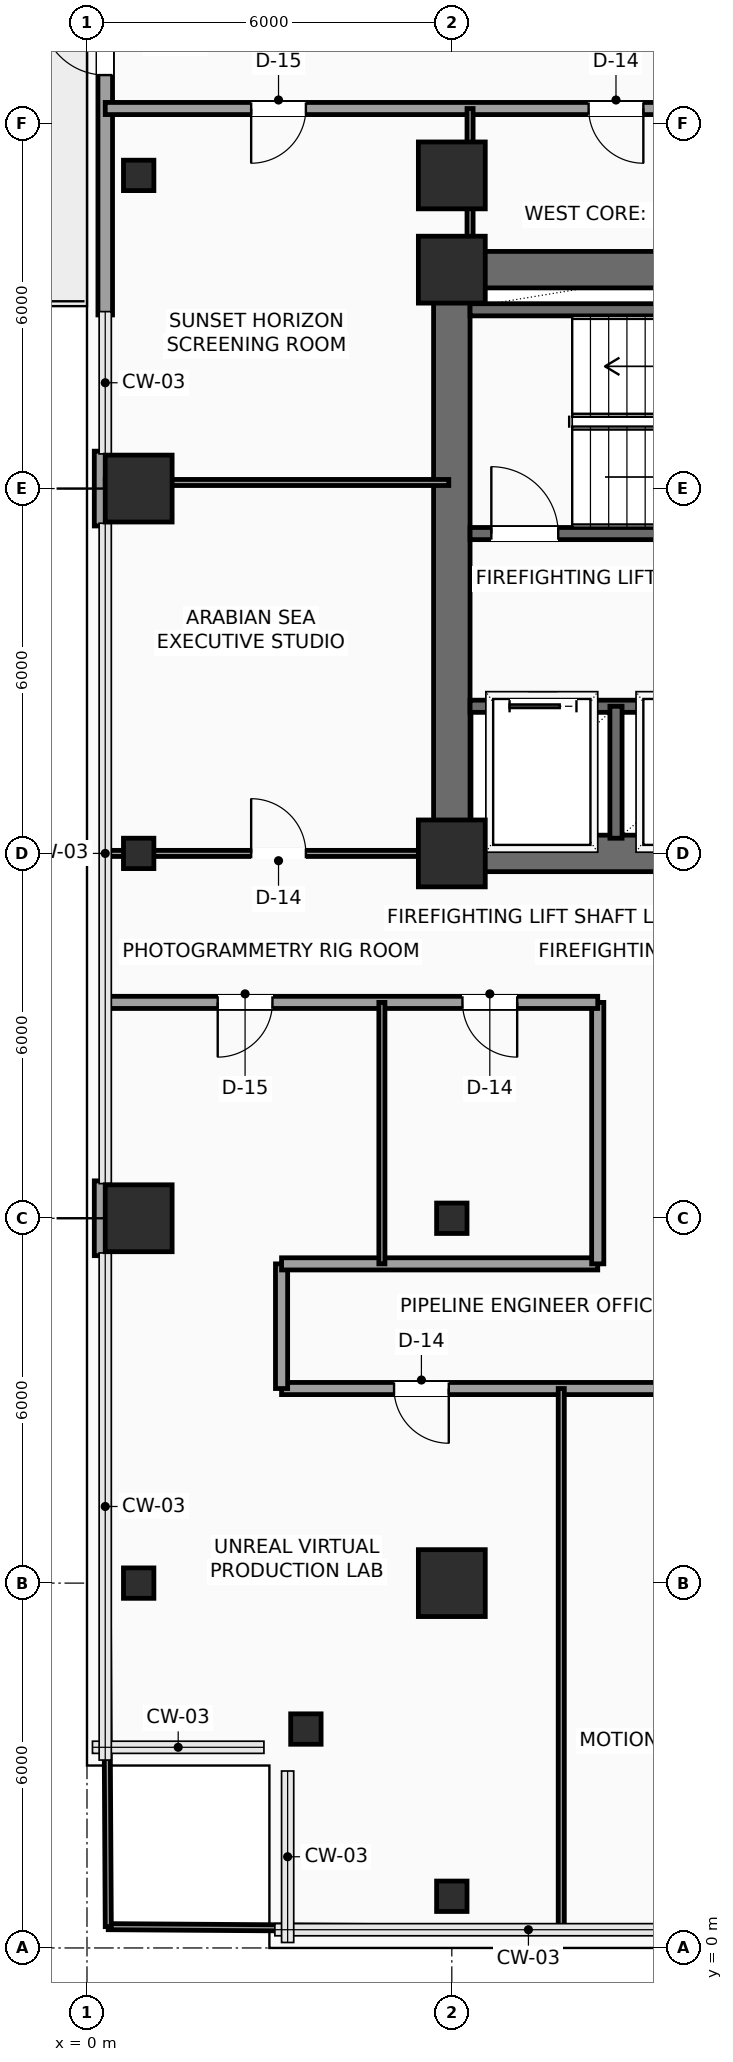
"""IFC4 building model, lengths in metres.
Left out: names, types, materials, properties, quantities, classifications, styles, units other than length and angle.
Written with IfcOpenShell. Run it as: python <this file> out.ifc"""

import sys

from ifc_helpers import new_model, si_unit, direction, frame, frame_2d, origin, origin_2d, place, context, subcontext, project, spatial, rectangle, hollow_rectangle, extrude, element, fill, save


model = new_model("IFC4")
c1 = context("Model", 3, precision=1e-05, world=origin(), true_north=direction((0.0, 1.0)))
c2 = subcontext(c1, "Body", "Model", "MODEL_VIEW")
j1 = project(units=[si_unit("LENGTHUNIT", "METRE"), si_unit("PLANEANGLEUNIT", "RADIAN")], contexts=[c1])
p1 = place(None, origin())
s1 = spatial("IfcSite", under=j1, at=p1, CompositionType="ELEMENT")
p2 = place(p1, origin())
s2 = spatial("IfcBuilding", under=s1, at=p2, CompositionType="ELEMENT")
p3 = place(p2, frame((0.0, 0.0, 138.15)))
s3 = spatial("IfcBuildingStorey", under=s2, at=p3, CompositionType="ELEMENT", Elevation=138.15)
for number, where, z_axis, x_axis in (
    (1, (6.0, 18.0, 0.0), (0.0, 0.0, 1.0), (1.0, 0.0, 0.0)),
    (2, (6.0, 27.6, 0.0), (0.0, 0.0, 1.0), (1.0, 0.0, 0.0)),
):
    element("IfcColumn", number, at=place(p3, frame(where, z_axis=z_axis, x_axis=x_axis)), inside=s3, PredefinedType="COLUMN", context=c2, shape_type="SweptSolid", body=[
        extrude(rectangle(XDim=1.1, YDim=1.1, at=origin_2d()), origin(), (0.0, 0.0, 1.0), 3.75),
    ])
for number, where, z_axis, x_axis in (
    (3, (3.6, 3.6, 0.0), (0.0, 0.0, 1.0), (1.0, 0.0, 0.0)),
    (4, (0.85, 6.0, 0.0), (0.0, 0.0, 1.0), (1.0, 0.0, 0.0)),
):
    element("IfcColumn", number, at=place(p3, frame(where, z_axis=z_axis, x_axis=x_axis)), inside=s3, PredefinedType="COLUMN", context=c2, shape_type="SweptSolid", body=[
        extrude(hollow_rectangle(XDim=0.5, YDim=0.5, WallThickness=0.025, InnerFilletRadius=0.025, OuterFilletRadius=0.04, at=origin_2d()), origin(), (0.0, 0.0, 1.0), 3.75),
    ])
p4 = place(p3, frame((0.85, 12.0, 0.0), z_axis=(0.0, 0.0, 1.0), x_axis=(1.0, 0.0, 0.0)))
e5 = element("IfcColumn", 5, at=p4, inside=s3, PredefinedType="COLUMN", context=c2, shape_type="SweptSolid", body=[
    extrude(rectangle(XDim=1.1, YDim=1.1, at=origin_2d()), origin(), (0.0, 0.0, 1.0), 3.75),
])
p5 = place(p3, frame((0.85, 18.0, 0.0), z_axis=(0.0, 0.0, 1.0), x_axis=(1.0, 0.0, 0.0)))
e6 = element("IfcColumn", 6, at=p5, inside=s3, PredefinedType="COLUMN", context=c2, shape_type="SweptSolid", body=[
    extrude(hollow_rectangle(XDim=0.5, YDim=0.5, WallThickness=0.025, InnerFilletRadius=0.025, OuterFilletRadius=0.04, at=origin_2d()), origin(), (0.0, 0.0, 1.0), 3.75),
])
p6 = place(p3, frame((0.85, 24.0, 0.0), z_axis=(0.0, 0.0, 1.0), x_axis=(1.0, 0.0, 0.0)))
e7 = element("IfcColumn", 7, at=p6, inside=s3, PredefinedType="COLUMN", context=c2, shape_type="SweptSolid", body=[
    extrude(rectangle(XDim=1.1, YDim=1.1, at=origin_2d()), origin(), (0.0, 0.0, 1.0), 3.75),
])
for number, where, z_axis, x_axis in (
    (8, (0.85, 29.15, 0.0), (0.0, 0.0, 1.0), (1.0, 0.0, 0.0)),
    (9, (6.0, 0.85, 0.0), (0.0, 0.0, 1.0), (1.0, 0.0, 0.0)),
):
    element("IfcColumn", number, at=place(p3, frame(where, z_axis=z_axis, x_axis=x_axis)), inside=s3, PredefinedType="COLUMN", context=c2, shape_type="SweptSolid", body=[
        extrude(hollow_rectangle(XDim=0.5, YDim=0.5, WallThickness=0.025, InnerFilletRadius=0.025, OuterFilletRadius=0.04, at=origin_2d()), origin(), (0.0, 0.0, 1.0), 3.75),
    ])
p7 = place(p3, frame((6.0, 6.0, 0.0), z_axis=(0.0, 0.0, 1.0), x_axis=(1.0, 0.0, 0.0)))
e10 = element("IfcColumn", 10, at=p7, inside=s3, PredefinedType="COLUMN", context=c2, shape_type="SweptSolid", body=[
    extrude(rectangle(XDim=1.1, YDim=1.1, at=origin_2d()), origin(), (0.0, 0.0, 1.0), 3.75),
])
p8 = place(p3, frame((6.0, 12.0, 0.0), z_axis=(0.0, 0.0, 1.0), x_axis=(1.0, 0.0, 0.0)))
e11 = element("IfcColumn", 11, at=p8, inside=s3, PredefinedType="COLUMN", context=c2, shape_type="SweptSolid", body=[
    extrude(hollow_rectangle(XDim=0.5, YDim=0.5, WallThickness=0.025, InnerFilletRadius=0.025, OuterFilletRadius=0.04, at=origin_2d()), origin(), (0.0, 0.0, 1.0), 3.75),
])
p9 = place(p3, frame((6.0, 29.15, 0.0), z_axis=(0.0, 0.0, 1.0), x_axis=(1.0, 0.0, 0.0)))
e12 = element("IfcColumn", 12, at=p9, inside=s3, PredefinedType="COLUMN", context=c2, shape_type="SweptSolid", body=[
    extrude(rectangle(XDim=1.1, YDim=1.1, at=origin_2d()), origin(), (0.0, 0.0, 1.0), 3.75),
])
p10 = place(p3, frame((0.3, 26.855, 0.0), z_axis=(0.0, 0.0, 1.0), x_axis=(0.0, 1.0, 0.0)))
e13 = element("IfcWall", 13, at=p10, inside=s3, PredefinedType="SOLIDWALL", context=c2, shape_type="SweptSolid", body=[
    extrude(rectangle(XDim=9.29, YDim=0.24, at=frame_2d((4.645, 0.0))), origin(), (0.0, 0.0, 1.0), 3.525),
])
p11 = place(p10, frame((3.945, 0.0, 0.0)))
e14 = element("IfcOpeningElement", 14, at=p11, cuts=e13, PredefinedType="OPENING", context=c2, shape_type="SweptSolid", body=[
    extrude(rectangle(XDim=1.05, YDim=2.2, at=frame_2d((0.525, 1.1))), frame((0.0, 0.13, 0.0), z_axis=(0.0, -1.0, 0.0), x_axis=(1.0, 0.0, 0.0)), (0.0, 0.0, 1.0), 0.26),
])
for number, where, z_axis, x_axis in (
    (15, (0.24, 11.385, 0.0), (0.0, 0.0, 1.0), (0.0, 1.0, 0.0)),
    (16, (0.24, 23.385, 0.0), (0.0, 0.0, 1.0), (0.0, 1.0, 0.0)),
):
    element("IfcWall", number, at=place(p3, frame(where, z_axis=z_axis, x_axis=x_axis)), inside=s3, PredefinedType="SOLIDWALL", context=c2, shape_type="SweptSolid", body=[
        extrude(rectangle(XDim=1.23, YDim=0.24, at=frame_2d((0.615, 0.0))), origin(), (0.0, 0.0, 1.0), 3.525),
    ])
p12 = place(p3, frame((6.0, 18.0, 0.0), z_axis=(0.0, 0.0, 1.0), x_axis=(1.0, 0.0, 0.0)))
e17 = element("IfcWall", 17, at=p12, inside=s3, PredefinedType="SHEAR", context=c2, shape_type="SweptSolid", body=[
    extrude(rectangle(XDim=12.0, YDim=0.6, at=frame_2d((6.0, 0.0))), origin(), (0.0, 0.0, 1.0), 3.525),
])
p13 = place(p12, frame((7.15, 0.0, 0.0)))
e18 = element("IfcOpeningElement", 18, at=p13, cuts=e17, PredefinedType="OPENING", context=c2, shape_type="SweptSolid", body=[
    extrude(rectangle(XDim=1.6, YDim=2.3, at=frame_2d((0.8, 1.15))), frame((0.0, 0.31, 0.0), z_axis=(0.0, -1.0, 0.0), x_axis=(1.0, 0.0, 0.0)), (0.0, 0.0, 1.0), 0.62),
])
p14 = place(p3, frame((6.0, 27.6, 0.0), z_axis=(0.0, 0.0, 1.0), x_axis=(1.0, 0.0, 0.0)))
e19 = element("IfcWall", 19, at=p14, inside=s3, PredefinedType="SHEAR", context=c2, shape_type="SweptSolid", body=[
    extrude(rectangle(XDim=12.0, YDim=0.6, at=frame_2d((6.0, 0.0))), origin(), (0.0, 0.0, 1.0), 3.525),
])
p15 = place(p14, frame((10.2, 0.0, 0.0)))
e20 = element("IfcOpeningElement", 20, at=p15, cuts=e19, PredefinedType="OPENING", context=c2, shape_type="SweptSolid", body=[
    extrude(rectangle(XDim=0.9, YDim=2.15, at=frame_2d((0.45, 1.075))), frame((0.0, 0.31, 0.0), z_axis=(0.0, -1.0, 0.0), x_axis=(1.0, 0.0, 0.0)), (0.0, 0.0, 1.0), 0.62),
])
p16 = place(p3, frame((6.0, 18.0, 0.0), z_axis=(0.0, 0.0, 1.0), x_axis=(0.0, 1.0, 0.0)))
e21 = element("IfcWall", 21, at=p16, inside=s3, PredefinedType="SHEAR", context=c2, shape_type="SweptSolid", body=[
    extrude(rectangle(XDim=9.6, YDim=0.6, at=frame_2d((4.8, 0.0))), origin(), (0.0, 0.0, 1.0), 3.525),
])
p17 = place(p3, frame((6.3, 23.26, 0.0), z_axis=(0.0, 0.0, 1.0), x_axis=(1.0, 0.0, 0.0)))
e22 = element("IfcWall", 22, at=p17, inside=s3, PredefinedType="SHEAR", context=c2, shape_type="SweptSolid", body=[
    extrude(rectangle(XDim=8.88, YDim=0.2, at=frame_2d((4.44, 0.0))), origin(), (0.0, 0.0, 1.0), 3.525),
])
p18 = place(p17, frame((0.35, 0.0, 0.0)))
e23 = element("IfcOpeningElement", 23, at=p18, cuts=e22, PredefinedType="OPENING", context=c2, shape_type="SweptSolid", body=[
    extrude(rectangle(XDim=1.1, YDim=2.2, at=frame_2d((0.55, 1.1))), frame((0.0, 0.11, 0.0), z_axis=(0.0, -1.0, 0.0), x_axis=(1.0, 0.0, 0.0)), (0.0, 0.0, 1.0), 0.22),
])
p19 = place(p3, frame((6.3, 26.94, 0.0), z_axis=(0.0, 0.0, 1.0), x_axis=(1.0, 0.0, 0.0)))
e24 = element("IfcWall", 24, at=p19, inside=s3, PredefinedType="SHEAR", context=c2, shape_type="SweptSolid", body=[
    extrude(rectangle(XDim=8.88, YDim=0.2, at=frame_2d((4.44, 0.0))), origin(), (0.0, 0.0, 1.0), 3.525),
])
p20 = place(p3, frame((6.3, 20.42, 0.0), z_axis=(0.0, 0.0, 1.0), x_axis=(1.0, 0.0, 0.0)))
e25 = element("IfcWall", 25, at=p20, inside=s3, PredefinedType="SHEAR", context=c2, shape_type="SweptSolid", body=[
    extrude(rectangle(XDim=4.95, YDim=0.2, at=frame_2d((2.475, 0.0))), origin(), (0.0, 0.0, 1.0), 3.525),
])
p21 = place(p20, frame((0.65, 0.0, 0.0)))
e26 = element("IfcOpeningElement", 26, at=p21, cuts=e25, PredefinedType="OPENING", context=c2, shape_type="SweptSolid", body=[
    extrude(rectangle(XDim=1.1, YDim=2.2, at=frame_2d((0.55, 1.1))), frame((0.0, 0.11, 0.0), z_axis=(0.0, -1.0, 0.0), x_axis=(1.0, 0.0, 0.0)), (0.0, 0.0, 1.0), 0.22),
])
p22 = place(p20, frame((3.05, 0.0, 0.0)))
e27 = element("IfcOpeningElement", 27, at=p22, cuts=e25, PredefinedType="OPENING", context=c2, shape_type="SweptSolid", body=[
    extrude(rectangle(XDim=1.1, YDim=2.2, at=frame_2d((0.55, 1.1))), frame((0.0, 0.11, 0.0), z_axis=(0.0, -1.0, 0.0), x_axis=(1.0, 0.0, 0.0)), (0.0, 0.0, 1.0), 0.22),
])
p23 = place(p3, frame((8.7, 18.25, 0.0), z_axis=(0.0, 0.0, 1.0), x_axis=(0.0, 1.0, 0.0)))
e28 = element("IfcWall", 28, at=p23, inside=s3, PredefinedType="SHEAR", context=c2, shape_type="SweptSolid", body=[
    extrude(rectangle(XDim=2.17, YDim=0.2, at=frame_2d((1.085, 0.0))), origin(), (0.0, 0.0, 1.0), 3.525),
])
p24 = place(p3, frame((21.35, 9.2, 0.0), z_axis=(0.0, 0.0, 1.0), x_axis=(-1.0, 0.0, 0.0)))
e29 = element("IfcWall", 29, at=p24, inside=s3, PredefinedType="PARTITIONING", context=c2, shape_type="SweptSolid", body=[
    extrude(rectangle(XDim=18.15, YDim=0.2, at=frame_2d((9.075, 0.0))), origin(), (0.0, 0.0, 1.0), 3.067),
])
p25 = place(p24, frame((15.4, 0.0, 0.0)))
e30 = element("IfcOpeningElement", 30, at=p25, cuts=e29, PredefinedType="OPENING", context=c2, shape_type="SweptSolid", body=[
    extrude(rectangle(XDim=0.9, YDim=2.1, at=frame_2d((0.45, 1.05))), frame((0.0, 0.11, 0.0), z_axis=(0.0, -1.0, 0.0), x_axis=(1.0, 0.0, 0.0)), (0.0, 0.0, 1.0), 0.22),
])
p26 = place(p24, frame((9.1, 0.0, 0.0)))
e31 = element("IfcOpeningElement", 31, at=p26, cuts=e29, PredefinedType="OPENING", context=c2, shape_type="SweptSolid", body=[
    extrude(rectangle(XDim=0.9, YDim=2.1, at=frame_2d((0.45, 1.05))), frame((0.0, 0.11, 0.0), z_axis=(0.0, -1.0, 0.0), x_axis=(1.0, 0.0, 0.0)), (0.0, 0.0, 1.0), 0.22),
])
p27 = place(p24, frame((2.325, 0.0, 0.0)))
e32 = element("IfcOpeningElement", 32, at=p27, cuts=e29, PredefinedType="OPENING", context=c2, shape_type="SweptSolid", body=[
    extrude(rectangle(XDim=0.9, YDim=2.1, at=frame_2d((0.45, 1.05))), frame((0.0, 0.11, 0.0), z_axis=(0.0, -1.0, 0.0), x_axis=(1.0, 0.0, 0.0)), (0.0, 0.0, 1.0), 0.22),
])
p28 = place(p3, frame((3.2, 9.2, 0.0), z_axis=(0.0, 0.0, 1.0), x_axis=(0.0, 1.0, 0.0)))
e33 = element("IfcWall", 33, at=p28, inside=s3, PredefinedType="PARTITIONING", context=c2, shape_type="SweptSolid", body=[
    extrude(rectangle(XDim=2.05, YDim=0.2, at=frame_2d((1.025, 0.0))), origin(), (0.0, 0.0, 1.0), 3.525),
])
p29 = place(p3, frame((3.2, 11.25, 0.0), z_axis=(0.0, 0.0, 1.0), x_axis=(1.0, 0.0, 0.0)))
e34 = element("IfcWall", 34, at=p29, inside=s3, PredefinedType="PARTITIONING", context=c2, shape_type="SweptSolid", body=[
    extrude(rectangle(XDim=5.2, YDim=0.2, at=frame_2d((2.6, 0.0))), origin(), (0.0, 0.0, 1.0), 3.525),
])
p30 = place(p3, frame((8.4, 11.25, 0.0), z_axis=(0.0, 0.0, 1.0), x_axis=(0.0, 1.0, 0.0)))
e35 = element("IfcWall", 35, at=p30, inside=s3, PredefinedType="PARTITIONING", context=c2, shape_type="SweptSolid", body=[
    extrude(rectangle(XDim=4.3, YDim=0.2, at=frame_2d((2.15, 0.0))), origin(), (0.0, 0.0, 1.0), 3.525),
])
p31 = place(p3, frame((8.4, 15.55, 0.0), z_axis=(0.0, 0.0, 1.0), x_axis=(-1.0, 0.0, 0.0)))
e36 = element("IfcWall", 36, at=p31, inside=s3, PredefinedType="PARTITIONING", context=c2, shape_type="SweptSolid", body=[
    extrude(rectangle(XDim=8.1, YDim=0.2, at=frame_2d((4.05, 0.0))), origin(), (0.0, 0.0, 1.0), 3.525),
])
p32 = place(p31, frame((5.35, 0.0, 0.0)))
e37 = element("IfcOpeningElement", 37, at=p32, cuts=e36, PredefinedType="OPENING", context=c2, shape_type="SweptSolid", body=[
    extrude(rectangle(XDim=0.9, YDim=2.1, at=frame_2d((0.45, 1.05))), frame((0.0, 0.11, 0.0), z_axis=(0.0, -1.0, 0.0), x_axis=(1.0, 0.0, 0.0)), (0.0, 0.0, 1.0), 0.22),
])
p33 = place(p31, frame((1.325, 0.0, 0.0)))
e38 = element("IfcOpeningElement", 38, at=p33, cuts=e36, PredefinedType="OPENING", context=c2, shape_type="SweptSolid", body=[
    extrude(rectangle(XDim=0.9, YDim=2.1, at=frame_2d((0.45, 1.05))), frame((0.0, 0.11, 0.0), z_axis=(0.0, -1.0, 0.0), x_axis=(1.0, 0.0, 0.0)), (0.0, 0.0, 1.0), 0.22),
])
p34 = place(p3, frame((15.88, 30.25, 0.0), z_axis=(0.0, 0.0, 1.0), x_axis=(-1.0, 0.0, 0.0)))
e39 = element("IfcWall", 39, at=p34, inside=s3, PredefinedType="PARTITIONING", context=c2, shape_type="SweptSolid", body=[
    extrude(rectangle(XDim=15.58, YDim=0.2, at=frame_2d((7.79, 0.0))), origin(), (0.0, 0.0, 1.0), 3.525),
])
p35 = place(p34, frame((12.28, 0.0, 0.0)))
e40 = element("IfcOpeningElement", 40, at=p35, cuts=e39, PredefinedType="OPENING", context=c2, shape_type="SweptSolid", body=[
    extrude(rectangle(XDim=0.9, YDim=2.1, at=frame_2d((0.45, 1.05))), frame((0.0, 0.11, 0.0), z_axis=(0.0, -1.0, 0.0), x_axis=(1.0, 0.0, 0.0)), (0.0, 0.0, 1.0), 0.22),
])
p36 = place(p34, frame((6.73, 0.0, 0.0)))
e41 = element("IfcOpeningElement", 41, at=p36, cuts=e39, PredefinedType="OPENING", context=c2, shape_type="SweptSolid", body=[
    extrude(rectangle(XDim=0.9, YDim=2.1, at=frame_2d((0.45, 1.05))), frame((0.0, 0.11, 0.0), z_axis=(0.0, -1.0, 0.0), x_axis=(1.0, 0.0, 0.0)), (0.0, 0.0, 1.0), 0.22),
])
p37 = place(p34, frame((1.98, 0.0, 0.0)))
e42 = element("IfcOpeningElement", 42, at=p37, cuts=e39, PredefinedType="OPENING", context=c2, shape_type="SweptSolid", body=[
    extrude(rectangle(XDim=0.9, YDim=2.1, at=frame_2d((0.45, 1.05))), frame((0.0, 0.11, 0.0), z_axis=(0.0, -1.0, 0.0), x_axis=(1.0, 0.0, 0.0)), (0.0, 0.0, 1.0), 0.22),
])
p38 = place(p3, frame((0.3, 18.0, 0.0), z_axis=(0.0, 0.0, 1.0), x_axis=(1.0, 0.0, 0.0)))
e43 = element("IfcWall", 43, at=p38, inside=s3, PredefinedType="PARTITIONING", context=c2, shape_type="SweptSolid", body=[
    extrude(rectangle(XDim=5.65, YDim=0.1, at=frame_2d((2.825, 0.0))), origin(), (0.0, 0.0, 1.0), 3.017),
])
p39 = place(p38, frame((2.4, 0.0, 0.0)))
e44 = element("IfcOpeningElement", 44, at=p39, cuts=e43, PredefinedType="OPENING", context=c2, shape_type="SweptSolid", body=[
    extrude(rectangle(XDim=0.9, YDim=2.1, at=frame_2d((0.45, 1.05))), frame((0.0, 0.06, 0.0), z_axis=(0.0, -1.0, 0.0), x_axis=(1.0, 0.0, 0.0)), (0.0, 0.0, 1.0), 0.12),
])
p40 = place(p3, frame((0.3, 24.1, 0.0), z_axis=(0.0, 0.0, 1.0), x_axis=(1.0, 0.0, 0.0)))
e45 = element("IfcWall", 45, at=p40, inside=s3, PredefinedType="PARTITIONING", context=c2, shape_type="SweptSolid", body=[
    extrude(rectangle(XDim=5.65, YDim=0.1, at=frame_2d((2.825, 0.0))), origin(), (0.0, 0.0, 1.0), 3.525),
])
p41 = place(p3, frame((6.3, 27.65, 0.0), z_axis=(0.0, 0.0, 1.0), x_axis=(0.0, 1.0, 0.0)))
e46 = element("IfcWall", 46, at=p41, inside=s3, PredefinedType="PARTITIONING", context=c2, shape_type="SweptSolid", body=[
    extrude(rectangle(XDim=2.6, YDim=0.1, at=frame_2d((1.3, 0.0))), origin(), (0.0, 0.0, 1.0), 3.525),
])
p42 = place(p3, frame((0.35, 0.35, 0.0), z_axis=(0.0, 0.0, 1.0), x_axis=(0.999977434951, -0.006717855945, 0.0)))
e47 = element("IfcWall", 47, at=p42, inside=s3, PredefinedType="PARTITIONING", context=c2, shape_type="SweptSolid", body=[
    extrude(rectangle(XDim=7.45, YDim=0.1, at=frame_2d((3.725, 0.0))), origin(), (0.0, 0.0, 1.0), 3.525),
])
p43 = place(p3, frame((0.35, 0.35, 0.0), z_axis=(0.0, 0.0, 1.0), x_axis=(-0.005655237989, 0.999984009014, 0.0)))
e48 = element("IfcWall", 48, at=p43, inside=s3, PredefinedType="PARTITIONING", context=c2, shape_type="SweptSolid", body=[
    extrude(rectangle(XDim=8.85, YDim=0.1, at=frame_2d((4.425, 0.0))), origin(), (0.0, 0.0, 1.0), 3.525),
])
p44 = place(p3, frame((7.8, 0.3, 0.0), z_axis=(0.0, 0.0, 1.0), x_axis=(0.0, 1.0, 0.0)))
e49 = element("IfcWall", 49, at=p44, inside=s3, PredefinedType="PARTITIONING", context=c2, shape_type="SweptSolid", body=[
    extrude(rectangle(XDim=8.9, YDim=0.1, at=frame_2d((4.45, 0.0))), origin(), (0.0, 0.0, 1.0), 3.525),
])
p45 = place(p3, frame((4.85, 11.25, 0.0), z_axis=(0.0, 0.0, 1.0), x_axis=(0.0, 1.0, 0.0)))
e50 = element("IfcWall", 50, at=p45, inside=s3, PredefinedType="PARTITIONING", context=c2, shape_type="SweptSolid", body=[
    extrude(rectangle(XDim=4.3, YDim=0.1, at=frame_2d((2.15, 0.0))), origin(), (0.0, 0.0, 1.0), 3.525),
])
p46 = place(p11, origin())
e51 = element("IfcDoor", 51, at=p46, inside=s3, OperationType="SINGLE_SWING_RIGHT", PredefinedType="DOOR", context=c2, shape_type="SweptSolid", body=[
    extrude(rectangle(XDim=1.05, YDim=2.2, at=frame_2d((0.525, 1.1))), frame((0.0, 0.025, 0.0), z_axis=(0.0, -1.0, 0.0), x_axis=(1.0, 0.0, 0.0)), (0.0, 0.0, 1.0), 0.05),
])
fill(e14, e51)
p47 = place(p18, origin())
e52 = element("IfcDoor", 52, at=p47, inside=s3, OperationType="SINGLE_SWING_LEFT", PredefinedType="DOOR", context=c2, shape_type="SweptSolid", body=[
    extrude(rectangle(XDim=1.1, YDim=2.2, at=frame_2d((0.55, 1.1))), frame((0.0, 0.025, 0.0), z_axis=(0.0, -1.0, 0.0), x_axis=(1.0, 0.0, 0.0)), (0.0, 0.0, 1.0), 0.05),
])
fill(e23, e52)
p48 = place(p21, origin())
e53 = element("IfcDoor", 53, at=p48, inside=s3, OperationType="SLIDING_TO_LEFT", PredefinedType="DOOR", context=c2, shape_type="SweptSolid", body=[
    extrude(rectangle(XDim=1.1, YDim=2.2, at=frame_2d((0.55, 1.1))), frame((0.0, 0.025, 0.0), z_axis=(0.0, -1.0, 0.0), x_axis=(1.0, 0.0, 0.0)), (0.0, 0.0, 1.0), 0.05),
])
fill(e26, e53)
p49 = place(p25, origin())
e54 = element("IfcDoor", 54, at=p49, inside=s3, OperationType="SINGLE_SWING_LEFT", PredefinedType="DOOR", context=c2, shape_type="SweptSolid", body=[
    extrude(rectangle(XDim=0.9, YDim=2.1, at=frame_2d((0.45, 1.05))), frame((0.0, 0.025, 0.0), z_axis=(0.0, -1.0, 0.0), x_axis=(1.0, 0.0, 0.0)), (0.0, 0.0, 1.0), 0.05),
])
fill(e30, e54)
p50 = place(p32, origin())
e55 = element("IfcDoor", 55, at=p50, inside=s3, OperationType="SINGLE_SWING_RIGHT", PredefinedType="DOOR", context=c2, shape_type="SweptSolid", body=[
    extrude(rectangle(XDim=0.9, YDim=2.1, at=frame_2d((0.45, 1.05))), frame((0.0, 0.025, 0.0), z_axis=(0.0, -1.0, 0.0), x_axis=(1.0, 0.0, 0.0)), (0.0, 0.0, 1.0), 0.05),
])
fill(e37, e55)
p51 = place(p33, origin())
e56 = element("IfcDoor", 56, at=p51, inside=s3, OperationType="SINGLE_SWING_LEFT", PredefinedType="DOOR", context=c2, shape_type="SweptSolid", body=[
    extrude(rectangle(XDim=0.9, YDim=2.1, at=frame_2d((0.45, 1.05))), frame((0.0, 0.025, 0.0), z_axis=(0.0, -1.0, 0.0), x_axis=(1.0, 0.0, 0.0)), (0.0, 0.0, 1.0), 0.05),
])
fill(e38, e56)
p52 = place(p35, origin())
e57 = element("IfcDoor", 57, at=p52, inside=s3, OperationType="SINGLE_SWING_RIGHT", PredefinedType="DOOR", context=c2, shape_type="SweptSolid", body=[
    extrude(rectangle(XDim=0.9, YDim=2.1, at=frame_2d((0.45, 1.05))), frame((0.0, 0.025, 0.0), z_axis=(0.0, -1.0, 0.0), x_axis=(1.0, 0.0, 0.0)), (0.0, 0.0, 1.0), 0.05),
])
fill(e40, e57)
p53 = place(p36, origin())
e58 = element("IfcDoor", 58, at=p53, inside=s3, OperationType="SINGLE_SWING_LEFT", PredefinedType="DOOR", context=c2, shape_type="SweptSolid", body=[
    extrude(rectangle(XDim=0.9, YDim=2.1, at=frame_2d((0.45, 1.05))), frame((0.0, 0.025, 0.0), z_axis=(0.0, -1.0, 0.0), x_axis=(1.0, 0.0, 0.0)), (0.0, 0.0, 1.0), 0.05),
])
fill(e41, e58)
p54 = place(p39, origin())
e59 = element("IfcDoor", 59, at=p54, inside=s3, OperationType="SINGLE_SWING_LEFT", PredefinedType="DOOR", context=c2, shape_type="SweptSolid", body=[
    extrude(rectangle(XDim=0.9, YDim=2.1, at=frame_2d((0.45, 1.05))), frame((0.0, 0.025, 0.0), z_axis=(0.0, -1.0, 0.0), x_axis=(1.0, 0.0, 0.0)), (0.0, 0.0, 1.0), 0.05),
])
fill(e44, e59)
save(model, sys.argv[1])
